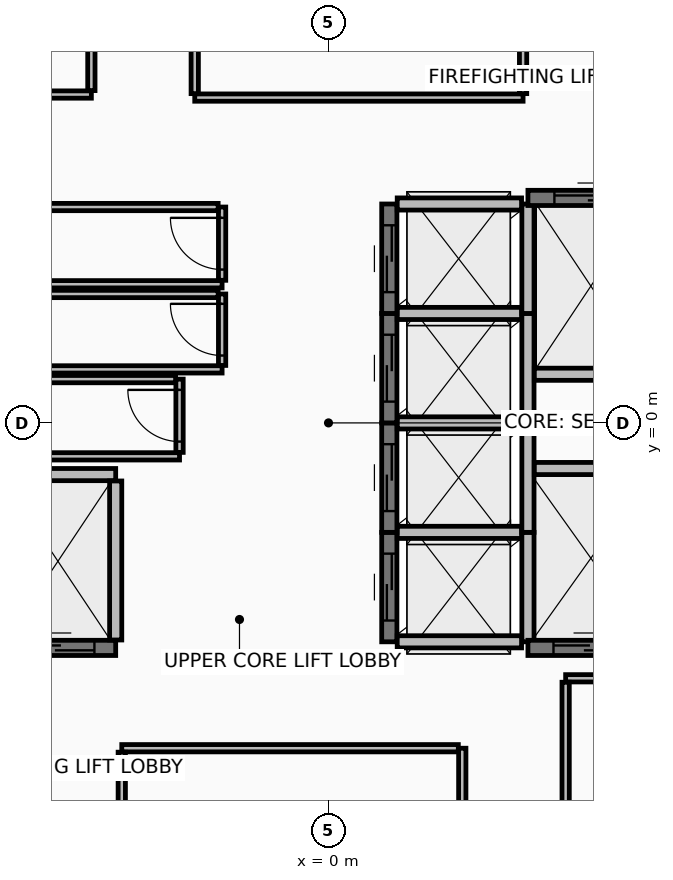
"""IFC4 building model, lengths in metres.
Left out: names, types, materials, properties, quantities, classifications, styles, units other than length and angle.
Written with IfcOpenShell. Run it as: python <this file> out.ifc"""

import sys

from ifc_helpers import new_model, si_unit, direction, frame, frame_2d, origin, place, context, subcontext, project, spatial, rectangle, extrude, element, fill, save


model = new_model("IFC4")
c1 = context("Model", 3, precision=1e-05, world=origin(), true_north=direction((0.0, 1.0)))
c2 = subcontext(c1, "Body", "Model", "MODEL_VIEW")
j1 = project(units=[si_unit("LENGTHUNIT", "METRE"), si_unit("PLANEANGLEUNIT", "RADIAN")], contexts=[c1])
p1 = place(None, origin())
s1 = spatial("IfcSite", under=j1, at=p1, CompositionType="ELEMENT")
p2 = place(p1, origin())
s2 = spatial("IfcBuilding", under=s1, at=p2, CompositionType="ELEMENT")
p3 = place(p2, frame((0.0, 0.0, 230.65)))
s3 = spatial("IfcBuildingStorey", under=s2, at=p3, CompositionType="ELEMENT", Elevation=230.65)
p4 = place(p3, frame((1.0, -3.6, 0.0), z_axis=(0.0, 0.0, 1.0), x_axis=(0.0, 1.0, 0.0)))
e1 = element("IfcWall", 1, at=p4, inside=s3, PredefinedType="SHEAR", context=c2, shape_type="SweptSolid", body=[
    extrude(rectangle(XDim=1.8, YDim=0.25, at=frame_2d((0.9, 0.0))), origin(), (0.0, 0.0, 1.0), 3.42),
])
p5 = place(p4, frame((0.35, 0.0, 0.0)))
e2 = element("IfcOpeningElement", 2, at=p5, cuts=e1, PredefinedType="OPENING", context=c2, shape_type="SweptSolid", body=[
    extrude(rectangle(XDim=1.1, YDim=2.2, at=frame_2d((0.55, 1.1))), frame((0.0, 0.135, 0.0), z_axis=(0.0, -1.0, 0.0), x_axis=(1.0, 0.0, 0.0)), (0.0, 0.0, 1.0), 0.27),
])
p6 = place(p3, frame((3.28, -3.6, 0.0), z_axis=(0.0, 0.0, 1.0), x_axis=(0.0, 1.0, 0.0)))
e3 = element("IfcWall", 3, at=p6, inside=s3, PredefinedType="PARTITIONING", context=c2, shape_type="SweptSolid", body=[
    extrude(rectangle(XDim=1.8, YDim=0.2, at=frame_2d((0.9, 0.0))), origin(), (0.0, 0.0, 1.0), 3.42),
])
for number, where, z_axis, x_axis in (
    (4, (1.13, -3.6, 0.0), (0.0, 0.0, 1.0), (1.0, 0.0, 0.0)),
    (5, (1.13, -1.8, 0.0), (0.0, 0.0, 1.0), (1.0, 0.0, 0.0)),
):
    element("IfcWall", number, at=place(p3, frame(where, z_axis=z_axis, x_axis=x_axis)), inside=s3, PredefinedType="PARTITIONING", context=c2, shape_type="SweptSolid", body=[
        extrude(rectangle(XDim=2.045, YDim=0.2, at=frame_2d((1.022, 0.0))), origin(), (0.0, 0.0, 1.0), 3.42),
    ])
p7 = place(p3, frame((1.0, -1.8, 0.0), z_axis=(0.0, 0.0, 1.0), x_axis=(0.0, 1.0, 0.0)))
e6 = element("IfcWall", 6, at=p7, inside=s3, PredefinedType="SHEAR", context=c2, shape_type="SweptSolid", body=[
    extrude(rectangle(XDim=1.8, YDim=0.25, at=frame_2d((0.9, 0.0))), origin(), (0.0, 0.0, 1.0), 3.42),
])
p8 = place(p7, frame((0.35, 0.0, 0.0)))
e7 = element("IfcOpeningElement", 7, at=p8, cuts=e6, PredefinedType="OPENING", context=c2, shape_type="SweptSolid", body=[
    extrude(rectangle(XDim=1.1, YDim=2.2, at=frame_2d((0.55, 1.1))), frame((0.0, 0.135, 0.0), z_axis=(0.0, -1.0, 0.0), x_axis=(1.0, 0.0, 0.0)), (0.0, 0.0, 1.0), 0.27),
])
p9 = place(p3, frame((3.28, -1.8, 0.0), z_axis=(0.0, 0.0, 1.0), x_axis=(0.0, 1.0, 0.0)))
e8 = element("IfcWall", 8, at=p9, inside=s3, PredefinedType="PARTITIONING", context=c2, shape_type="SweptSolid", body=[
    extrude(rectangle(XDim=1.8, YDim=0.2, at=frame_2d((0.9, 0.0))), origin(), (0.0, 0.0, 1.0), 3.42),
])
p10 = place(p3, frame((1.13, 0.0, 0.0), z_axis=(0.0, 0.0, 1.0), x_axis=(1.0, 0.0, 0.0)))
e9 = element("IfcWall", 9, at=p10, inside=s3, PredefinedType="PARTITIONING", context=c2, shape_type="SweptSolid", body=[
    extrude(rectangle(XDim=2.045, YDim=0.2, at=frame_2d((1.022, 0.0))), origin(), (0.0, 0.0, 1.0), 3.42),
])
p11 = place(p3, frame((1.0, 0.0, 0.0), z_axis=(0.0, 0.0, 1.0), x_axis=(0.0, 1.0, 0.0)))
e10 = element("IfcWall", 10, at=p11, inside=s3, PredefinedType="SHEAR", context=c2, shape_type="SweptSolid", body=[
    extrude(rectangle(XDim=1.8, YDim=0.25, at=frame_2d((0.9, 0.0))), origin(), (0.0, 0.0, 1.0), 3.42),
])
p12 = place(p11, frame((0.35, 0.0, 0.0)))
e11 = element("IfcOpeningElement", 11, at=p12, cuts=e10, PredefinedType="OPENING", context=c2, shape_type="SweptSolid", body=[
    extrude(rectangle(XDim=1.1, YDim=2.2, at=frame_2d((0.55, 1.1))), frame((0.0, 0.135, 0.0), z_axis=(0.0, -1.0, 0.0), x_axis=(1.0, 0.0, 0.0)), (0.0, 0.0, 1.0), 0.27),
])
p13 = place(p3, frame((3.28, 0.0, 0.0), z_axis=(0.0, 0.0, 1.0), x_axis=(0.0, 1.0, 0.0)))
e12 = element("IfcWall", 12, at=p13, inside=s3, PredefinedType="PARTITIONING", context=c2, shape_type="SweptSolid", body=[
    extrude(rectangle(XDim=1.8, YDim=0.2, at=frame_2d((0.9, 0.0))), origin(), (0.0, 0.0, 1.0), 3.42),
])
p14 = place(p3, frame((1.13, 1.8, 0.0), z_axis=(0.0, 0.0, 1.0), x_axis=(1.0, 0.0, 0.0)))
e13 = element("IfcWall", 13, at=p14, inside=s3, PredefinedType="PARTITIONING", context=c2, shape_type="SweptSolid", body=[
    extrude(rectangle(XDim=2.045, YDim=0.2, at=frame_2d((1.022, 0.0))), origin(), (0.0, 0.0, 1.0), 3.42),
])
p15 = place(p3, frame((1.0, 1.8, 0.0), z_axis=(0.0, 0.0, 1.0), x_axis=(0.0, 1.0, 0.0)))
e14 = element("IfcWall", 14, at=p15, inside=s3, PredefinedType="SHEAR", context=c2, shape_type="SweptSolid", body=[
    extrude(rectangle(XDim=1.8, YDim=0.25, at=frame_2d((0.9, 0.0))), origin(), (0.0, 0.0, 1.0), 3.42),
])
p16 = place(p15, frame((0.35, 0.0, 0.0)))
e15 = element("IfcOpeningElement", 15, at=p16, cuts=e14, PredefinedType="OPENING", context=c2, shape_type="SweptSolid", body=[
    extrude(rectangle(XDim=1.1, YDim=2.2, at=frame_2d((0.55, 1.1))), frame((0.0, 0.135, 0.0), z_axis=(0.0, -1.0, 0.0), x_axis=(1.0, 0.0, 0.0)), (0.0, 0.0, 1.0), 0.27),
])
p17 = place(p3, frame((3.28, 1.8, 0.0), z_axis=(0.0, 0.0, 1.0), x_axis=(0.0, 1.0, 0.0)))
e16 = element("IfcWall", 16, at=p17, inside=s3, PredefinedType="PARTITIONING", context=c2, shape_type="SweptSolid", body=[
    extrude(rectangle(XDim=1.8, YDim=0.2, at=frame_2d((0.9, 0.0))), origin(), (0.0, 0.0, 1.0), 3.42),
])
p18 = place(p3, frame((1.13, 3.6, 0.0), z_axis=(0.0, 0.0, 1.0), x_axis=(1.0, 0.0, 0.0)))
e17 = element("IfcWall", 17, at=p18, inside=s3, PredefinedType="PARTITIONING", context=c2, shape_type="SweptSolid", body=[
    extrude(rectangle(XDim=2.045, YDim=0.2, at=frame_2d((1.022, 0.0))), origin(), (0.0, 0.0, 1.0), 2.715),
])
p19 = place(p3, frame((-5.4, -3.7, 0.0), z_axis=(0.0, 0.0, 1.0), x_axis=(1.0, 0.0, 0.0)))
e18 = element("IfcWall", 18, at=p19, inside=s3, PredefinedType="SHEAR", context=c2, shape_type="SweptSolid", body=[
    extrude(rectangle(XDim=1.9, YDim=0.25, at=frame_2d((0.95, 0.0))), origin(), (0.0, 0.0, 1.0), 3.42),
])
p20 = place(p19, frame((0.35, 0.0, 0.0)))
e19 = element("IfcOpeningElement", 19, at=p20, cuts=e18, PredefinedType="OPENING", context=c2, shape_type="SweptSolid", body=[
    extrude(rectangle(XDim=1.2, YDim=2.2, at=frame_2d((0.6, 1.1))), frame((0.0, 0.135, 0.0), z_axis=(0.0, -1.0, 0.0), x_axis=(1.0, 0.0, 0.0)), (0.0, 0.0, 1.0), 0.27),
])
p21 = place(p3, frame((-5.27, -0.85, 0.0), z_axis=(0.0, 0.0, 1.0), x_axis=(1.0, 0.0, 0.0)))
e20 = element("IfcWall", 20, at=p21, inside=s3, PredefinedType="PARTITIONING", context=c2, shape_type="SweptSolid", body=[
    extrude(rectangle(XDim=1.77, YDim=0.2, at=frame_2d((0.885, 0.0))), origin(), (0.0, 0.0, 1.0), 3.42),
])
p22 = place(p3, frame((-3.5, -3.57, 0.0), z_axis=(0.0, 0.0, 1.0), x_axis=(0.0, 1.0, 0.0)))
e21 = element("IfcWall", 21, at=p22, inside=s3, PredefinedType="PARTITIONING", context=c2, shape_type="SweptSolid", body=[
    extrude(rectangle(XDim=2.615, YDim=0.2, at=frame_2d((1.308, 0.0))), origin(), (0.0, 0.0, 1.0), 3.42),
])
p23 = place(p3, frame((3.28, 3.7, 0.0), z_axis=(0.0, 0.0, 1.0), x_axis=(1.0, 0.0, 0.0)))
e22 = element("IfcWall", 22, at=p23, inside=s3, PredefinedType="SHEAR", context=c2, shape_type="SweptSolid", body=[
    extrude(rectangle(XDim=2.07, YDim=0.25, at=frame_2d((1.035, 0.0))), origin(), (0.0, 0.0, 1.0), 3.42),
])
p24 = place(p23, frame((0.435, 0.0, 0.0)))
e23 = element("IfcOpeningElement", 23, at=p24, cuts=e22, PredefinedType="OPENING", context=c2, shape_type="SweptSolid", body=[
    extrude(rectangle(XDim=1.2, YDim=2.2, at=frame_2d((0.6, 1.1))), frame((0.0, 0.135, 0.0), z_axis=(0.0, -1.0, 0.0), x_axis=(1.0, 0.0, 0.0)), (0.0, 0.0, 1.0), 0.27),
])
p25 = place(p3, frame((3.385, 0.8, 0.0), z_axis=(0.0, 0.0, 1.0), x_axis=(1.0, 0.0, 0.0)))
e24 = element("IfcWall", 24, at=p25, inside=s3, PredefinedType="PARTITIONING", context=c2, shape_type="SweptSolid", body=[
    extrude(rectangle(XDim=1.835, YDim=0.2, at=frame_2d((0.917, 0.0))), origin(), (0.0, 0.0, 1.0), 3.42),
])
p26 = place(p3, frame((3.28, -3.7, 0.0), z_axis=(0.0, 0.0, 1.0), x_axis=(1.0, 0.0, 0.0)))
e25 = element("IfcWall", 25, at=p26, inside=s3, PredefinedType="SHEAR", context=c2, shape_type="SweptSolid", body=[
    extrude(rectangle(XDim=1.94, YDim=0.25, at=frame_2d((0.97, 0.0))), origin(), (0.0, 0.0, 1.0), 3.42),
])
p27 = place(p26, frame((0.42, 0.0, 0.0)))
e26 = element("IfcOpeningElement", 26, at=p27, cuts=e25, PredefinedType="OPENING", context=c2, shape_type="SweptSolid", body=[
    extrude(rectangle(XDim=1.1, YDim=2.2, at=frame_2d((0.55, 1.1))), frame((0.0, 0.135, 0.0), z_axis=(0.0, -1.0, 0.0), x_axis=(1.0, 0.0, 0.0)), (0.0, 0.0, 1.0), 0.27),
])
p28 = place(p3, frame((3.385, -0.75, 0.0), z_axis=(0.0, 0.0, 1.0), x_axis=(1.0, 0.0, 0.0)))
e27 = element("IfcWall", 27, at=p28, inside=s3, PredefinedType="PARTITIONING", context=c2, shape_type="SweptSolid", body=[
    extrude(rectangle(XDim=1.835, YDim=0.2, at=frame_2d((0.917, 0.0))), origin(), (0.0, 0.0, 1.0), 3.42),
])
p29 = place(p3, frame((-5.22, 2.28, 0.0), z_axis=(0.0, 0.0, 1.0), x_axis=(1.0, 0.0, 0.0)))
e28 = element("IfcWall", 28, at=p29, inside=s3, PredefinedType="PARTITIONING", context=c2, shape_type="SweptSolid", body=[
    extrude(rectangle(XDim=3.47, YDim=0.12, at=frame_2d((1.735, 0.0))), origin(), (0.0, 0.0, 1.0), 3.42),
])
p30 = place(p3, frame((-1.75, 2.345, 0.0), z_axis=(0.0, 0.0, 1.0), x_axis=(0.0, 1.0, 0.0)))
e29 = element("IfcWall", 29, at=p30, inside=s3, PredefinedType="PARTITIONING", context=c2, shape_type="SweptSolid", body=[
    extrude(rectangle(XDim=1.205, YDim=0.12, at=frame_2d((0.603, 0.0))), origin(), (0.0, 0.0, 1.0), 3.42),
])
p31 = place(p30, frame((0.177, 0.0, 0.0)))
e30 = element("IfcOpeningElement", 30, at=p31, cuts=e29, PredefinedType="OPENING", context=c2, shape_type="SweptSolid", body=[
    extrude(rectangle(XDim=0.85, YDim=2.1, at=frame_2d((0.425, 1.05))), frame((0.0, 0.07, 0.0), z_axis=(0.0, -1.0, 0.0), x_axis=(1.0, 0.0, 0.0)), (0.0, 0.0, 1.0), 0.14),
])
p32 = place(p3, frame((-1.815, 3.55, 0.0), z_axis=(0.0, 0.0, 1.0), x_axis=(-1.0, 0.0, 0.0)))
e31 = element("IfcWall", 31, at=p32, inside=s3, PredefinedType="PARTITIONING", context=c2, shape_type="SweptSolid", body=[
    extrude(rectangle(XDim=3.405, YDim=0.12, at=frame_2d((1.703, 0.0))), origin(), (0.0, 0.0, 1.0), 3.42),
])
p33 = place(p3, frame((-5.22, 0.88, 0.0), z_axis=(0.0, 0.0, 1.0), x_axis=(1.0, 0.0, 0.0)))
e32 = element("IfcWall", 32, at=p33, inside=s3, PredefinedType="PARTITIONING", context=c2, shape_type="SweptSolid", body=[
    extrude(rectangle(XDim=3.47, YDim=0.12, at=frame_2d((1.735, 0.0))), origin(), (0.0, 0.0, 1.0), 3.42),
])
p34 = place(p3, frame((-1.75, 0.945, 0.0), z_axis=(0.0, 0.0, 1.0), x_axis=(0.0, 1.0, 0.0)))
e33 = element("IfcWall", 33, at=p34, inside=s3, PredefinedType="PARTITIONING", context=c2, shape_type="SweptSolid", body=[
    extrude(rectangle(XDim=1.175, YDim=0.12, at=frame_2d((0.587, 0.0))), origin(), (0.0, 0.0, 1.0), 3.42),
])
p35 = place(p34, frame((0.163, 0.0, 0.0)))
e34 = element("IfcOpeningElement", 34, at=p35, cuts=e33, PredefinedType="OPENING", context=c2, shape_type="SweptSolid", body=[
    extrude(rectangle(XDim=0.85, YDim=2.1, at=frame_2d((0.425, 1.05))), frame((0.0, 0.07, 0.0), z_axis=(0.0, -1.0, 0.0), x_axis=(1.0, 0.0, 0.0)), (0.0, 0.0, 1.0), 0.14),
])
p36 = place(p3, frame((-1.815, 2.12, 0.0), z_axis=(0.0, 0.0, 1.0), x_axis=(-1.0, 0.0, 0.0)))
e35 = element("IfcWall", 35, at=p36, inside=s3, PredefinedType="PARTITIONING", context=c2, shape_type="SweptSolid", body=[
    extrude(rectangle(XDim=3.405, YDim=0.12, at=frame_2d((1.703, 0.0))), origin(), (0.0, 0.0, 1.0), 3.42),
])
p37 = place(p3, frame((-5.22, -0.55, 0.0), z_axis=(0.0, 0.0, 1.0), x_axis=(1.0, 0.0, 0.0)))
e36 = element("IfcWall", 36, at=p37, inside=s3, PredefinedType="PARTITIONING", context=c2, shape_type="SweptSolid", body=[
    extrude(rectangle(XDim=2.77, YDim=0.12, at=frame_2d((1.385, 0.0))), origin(), (0.0, 0.0, 1.0), 3.42),
])
p38 = place(p3, frame((-2.45, -0.485, 0.0), z_axis=(0.0, 0.0, 1.0), x_axis=(0.0, 1.0, 0.0)))
e37 = element("IfcWall", 37, at=p38, inside=s3, PredefinedType="PARTITIONING", context=c2, shape_type="SweptSolid", body=[
    extrude(rectangle(XDim=1.205, YDim=0.12, at=frame_2d((0.603, 0.0))), origin(), (0.0, 0.0, 1.0), 3.42),
])
p39 = place(p38, frame((0.178, 0.0, 0.0)))
e38 = element("IfcOpeningElement", 38, at=p39, cuts=e37, PredefinedType="OPENING", context=c2, shape_type="SweptSolid", body=[
    extrude(rectangle(XDim=0.85, YDim=2.1, at=frame_2d((0.425, 1.05))), frame((0.0, 0.07, 0.0), z_axis=(0.0, -1.0, 0.0), x_axis=(1.0, 0.0, 0.0)), (0.0, 0.0, 1.0), 0.14),
])
p40 = place(p3, frame((-2.515, 0.72, 0.0), z_axis=(0.0, 0.0, 1.0), x_axis=(-1.0, 0.0, 0.0)))
e39 = element("IfcWall", 39, at=p40, inside=s3, PredefinedType="PARTITIONING", context=c2, shape_type="SweptSolid", body=[
    extrude(rectangle(XDim=2.705, YDim=0.12, at=frame_2d((1.353, 0.0))), origin(), (0.0, 0.0, 1.0), 3.42),
])
p41 = place(p3, frame((2.2, -7.42, 0.0), z_axis=(0.0, 0.0, 1.0), x_axis=(0.0, 1.0, 0.0)))
e40 = element("IfcWall", 40, at=p41, inside=s3, PredefinedType="PARTITIONING", context=c2, shape_type="SweptSolid", body=[
    extrude(rectangle(XDim=2.07, YDim=0.12, at=frame_2d((1.035, 0.0))), origin(), (0.0, 0.0, 1.0), 2.715),
])
p42 = place(p3, frame((2.135, -5.35, 0.0), z_axis=(0.0, 0.0, 1.0), x_axis=(-1.0, 0.0, 0.0)))
e41 = element("IfcWall", 41, at=p42, inside=s3, PredefinedType="PARTITIONING", context=c2, shape_type="SweptSolid", body=[
    extrude(rectangle(XDim=5.535, YDim=0.12, at=frame_2d((2.768, 0.0))), origin(), (0.0, 0.0, 1.0), 2.715),
])
p43 = place(p3, frame((-3.4, -5.415, 0.0), z_axis=(0.0, 0.0, 1.0), x_axis=(0.0, -1.0, 0.0)))
e42 = element("IfcWall", 42, at=p43, inside=s3, PredefinedType="PARTITIONING", context=c2, shape_type="SweptSolid", body=[
    extrude(rectangle(XDim=2.8, YDim=0.12, at=frame_2d((1.4, 0.0))), origin(), (0.0, 0.0, 1.0), 2.715),
])
p44 = place(p3, frame((-2.2, 5.35, 0.0), z_axis=(0.0, 0.0, 1.0), x_axis=(1.0, 0.0, 0.0)))
e43 = element("IfcWall", 43, at=p44, inside=s3, PredefinedType="PARTITIONING", context=c2, shape_type="SweptSolid", body=[
    extrude(rectangle(XDim=5.4, YDim=0.12, at=frame_2d((2.7, 0.0))), origin(), (0.0, 0.0, 1.0), 2.715),
])
p45 = place(p3, frame((3.2, 5.415, 0.0), z_axis=(0.0, 0.0, 1.0), x_axis=(0.0, 1.0, 0.0)))
e44 = element("IfcWall", 44, at=p45, inside=s3, PredefinedType="PARTITIONING", context=c2, shape_type="SweptSolid", body=[
    extrude(rectangle(XDim=2.8, YDim=0.12, at=frame_2d((1.4, 0.0))), origin(), (0.0, 0.0, 1.0), 2.715),
])
p46 = place(p3, frame((-2.2, 7.42, 0.0), z_axis=(0.0, 0.0, 1.0), x_axis=(0.0, -1.0, 0.0)))
e45 = element("IfcWall", 45, at=p46, inside=s3, PredefinedType="PARTITIONING", context=c2, shape_type="SweptSolid", body=[
    extrude(rectangle(XDim=2.005, YDim=0.12, at=frame_2d((1.002, 0.0))), origin(), (0.0, 0.0, 1.0), 2.715),
])
p47 = place(p3, frame((-6.2, 5.4, 0.0), z_axis=(0.0, 0.0, 1.0), x_axis=(1.0, 0.0, 0.0)))
e46 = element("IfcWall", 46, at=p47, inside=s3, PredefinedType="PARTITIONING", context=c2, shape_type="SweptSolid", body=[
    extrude(rectangle(XDim=2.3, YDim=0.12, at=frame_2d((1.15, 0.0))), origin(), (0.0, 0.0, 1.0), 3.42),
])
p48 = place(p3, frame((-3.9, 5.465, 0.0), z_axis=(0.0, 0.0, 1.0), x_axis=(0.0, 1.0, 0.0)))
e47 = element("IfcWall", 47, at=p48, inside=s3, PredefinedType="PARTITIONING", context=c2, shape_type="SweptSolid", body=[
    extrude(rectangle(XDim=2.75, YDim=0.12, at=frame_2d((1.375, 0.0))), origin(), (0.0, 0.0, 1.0), 2.715),
])
p49 = place(p3, frame((7.735, -4.2, 0.0), z_axis=(0.0, 0.0, 1.0), x_axis=(-1.0, 0.0, 0.0)))
e48 = element("IfcWall", 48, at=p49, inside=s3, PredefinedType="PARTITIONING", context=c2, shape_type="SweptSolid", body=[
    extrude(rectangle(XDim=3.835, YDim=0.12, at=frame_2d((1.917, 0.0))), origin(), (0.0, 0.0, 1.0), 3.42),
])
p50 = place(p3, frame((3.9, -4.265, 0.0), z_axis=(0.0, 0.0, 1.0), x_axis=(0.0, -1.0, 0.0)))
e49 = element("IfcWall", 49, at=p50, inside=s3, PredefinedType="PARTITIONING", context=c2, shape_type="SweptSolid", body=[
    extrude(rectangle(XDim=3.95, YDim=0.12, at=frame_2d((1.975, 0.0))), origin(), (0.0, 0.0, 1.0), 2.715),
])
p51 = place(p5, origin())
e50 = element("IfcDoor", 50, at=p51, inside=s3, OperationType="SLIDING_TO_LEFT", PredefinedType="DOOR", context=c2, shape_type="SweptSolid", body=[
    extrude(rectangle(XDim=1.1, YDim=2.2, at=frame_2d((0.55, 1.1))), frame((0.0, 0.025, 0.0), z_axis=(0.0, -1.0, 0.0), x_axis=(1.0, 0.0, 0.0)), (0.0, 0.0, 1.0), 0.05),
])
fill(e2, e50)
p52 = place(p8, origin())
e51 = element("IfcDoor", 51, at=p52, inside=s3, OperationType="SLIDING_TO_LEFT", PredefinedType="DOOR", context=c2, shape_type="SweptSolid", body=[
    extrude(rectangle(XDim=1.1, YDim=2.2, at=frame_2d((0.55, 1.1))), frame((0.0, 0.025, 0.0), z_axis=(0.0, -1.0, 0.0), x_axis=(1.0, 0.0, 0.0)), (0.0, 0.0, 1.0), 0.05),
])
fill(e7, e51)
p53 = place(p12, origin())
e52 = element("IfcDoor", 52, at=p53, inside=s3, OperationType="SLIDING_TO_LEFT", PredefinedType="DOOR", context=c2, shape_type="SweptSolid", body=[
    extrude(rectangle(XDim=1.1, YDim=2.2, at=frame_2d((0.55, 1.1))), frame((0.0, 0.025, 0.0), z_axis=(0.0, -1.0, 0.0), x_axis=(1.0, 0.0, 0.0)), (0.0, 0.0, 1.0), 0.05),
])
fill(e11, e52)
p54 = place(p16, origin())
e53 = element("IfcDoor", 53, at=p54, inside=s3, OperationType="SLIDING_TO_LEFT", PredefinedType="DOOR", context=c2, shape_type="SweptSolid", body=[
    extrude(rectangle(XDim=1.1, YDim=2.2, at=frame_2d((0.55, 1.1))), frame((0.0, 0.025, 0.0), z_axis=(0.0, -1.0, 0.0), x_axis=(1.0, 0.0, 0.0)), (0.0, 0.0, 1.0), 0.05),
])
fill(e15, e53)
p55 = place(p20, origin())
e54 = element("IfcDoor", 54, at=p55, inside=s3, OperationType="SLIDING_TO_RIGHT", PredefinedType="DOOR", context=c2, shape_type="SweptSolid", body=[
    extrude(rectangle(XDim=1.2, YDim=2.2, at=frame_2d((0.6, 1.1))), frame((0.0, 0.025, 0.0), z_axis=(0.0, -1.0, 0.0), x_axis=(1.0, 0.0, 0.0)), (0.0, 0.0, 1.0), 0.05),
])
fill(e19, e54)
p56 = place(p24, origin())
e55 = element("IfcDoor", 55, at=p56, inside=s3, OperationType="SLIDING_TO_RIGHT", PredefinedType="DOOR", context=c2, shape_type="SweptSolid", body=[
    extrude(rectangle(XDim=1.2, YDim=2.2, at=frame_2d((0.6, 1.1))), frame((0.0, 0.025, 0.0), z_axis=(0.0, -1.0, 0.0), x_axis=(1.0, 0.0, 0.0)), (0.0, 0.0, 1.0), 0.05),
])
fill(e23, e55)
p57 = place(p27, origin())
e56 = element("IfcDoor", 56, at=p57, inside=s3, OperationType="SLIDING_TO_LEFT", PredefinedType="DOOR", context=c2, shape_type="SweptSolid", body=[
    extrude(rectangle(XDim=1.1, YDim=2.2, at=frame_2d((0.55, 1.1))), frame((0.0, 0.025, 0.0), z_axis=(0.0, -1.0, 0.0), x_axis=(1.0, 0.0, 0.0)), (0.0, 0.0, 1.0), 0.05),
])
fill(e26, e56)
p58 = place(p31, frame((0.85, 0.0, 0.0), z_axis=(0.0, 0.0, 1.0), x_axis=(-1.0, 0.0, 0.0)))
e57 = element("IfcDoor", 57, at=p58, inside=s3, OperationType="SINGLE_SWING_RIGHT", PredefinedType="DOOR", context=c2, shape_type="SweptSolid", body=[
    extrude(rectangle(XDim=0.85, YDim=2.1, at=frame_2d((0.425, 1.05))), frame((0.0, 0.025, 0.0), z_axis=(0.0, -1.0, 0.0), x_axis=(1.0, 0.0, 0.0)), (0.0, 0.0, 1.0), 0.05),
])
fill(e30, e57)
p59 = place(p35, frame((0.85, 0.0, 0.0), z_axis=(0.0, 0.0, 1.0), x_axis=(-1.0, 0.0, 0.0)))
e58 = element("IfcDoor", 58, at=p59, inside=s3, OperationType="SINGLE_SWING_RIGHT", PredefinedType="DOOR", context=c2, shape_type="SweptSolid", body=[
    extrude(rectangle(XDim=0.85, YDim=2.1, at=frame_2d((0.425, 1.05))), frame((0.0, 0.025, 0.0), z_axis=(0.0, -1.0, 0.0), x_axis=(1.0, 0.0, 0.0)), (0.0, 0.0, 1.0), 0.05),
])
fill(e34, e58)
p60 = place(p39, frame((0.85, 0.0, 0.0), z_axis=(0.0, 0.0, 1.0), x_axis=(-1.0, 0.0, 0.0)))
e59 = element("IfcDoor", 59, at=p60, inside=s3, OperationType="SINGLE_SWING_RIGHT", PredefinedType="DOOR", context=c2, shape_type="SweptSolid", body=[
    extrude(rectangle(XDim=0.85, YDim=2.1, at=frame_2d((0.425, 1.05))), frame((0.0, 0.025, 0.0), z_axis=(0.0, -1.0, 0.0), x_axis=(1.0, 0.0, 0.0)), (0.0, 0.0, 1.0), 0.05),
])
fill(e38, e59)
save(model, sys.argv[1])
